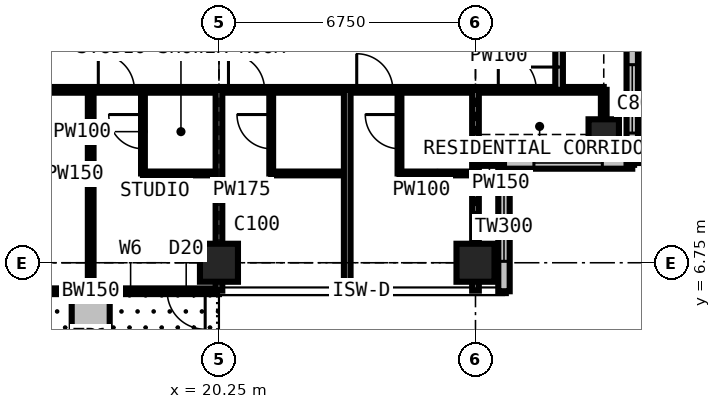
"""IFC4 building model, lengths in metres.
Left out: names, types, materials, properties, quantities, classifications, styles, units other than length and angle.
Written with IfcOpenShell. Run it as: python <this file> out.ifc"""

import sys

from ifc_helpers import new_model, si_unit, direction, frame, frame_2d, origin, origin_2d, place, context, subcontext, project, spatial, rectangle, extrude, element, fill, save


model = new_model("IFC4")
c1 = context("Model", 3, precision=1e-05, world=origin(), true_north=direction((0.0, 1.0)))
c2 = subcontext(c1, "Body", "Model", "MODEL_VIEW")
j1 = project(units=[si_unit("LENGTHUNIT", "METRE"), si_unit("PLANEANGLEUNIT", "RADIAN")], contexts=[c1])
p1 = place(None, origin())
s1 = spatial("IfcSite", under=j1, at=p1, CompositionType="ELEMENT")
p2 = place(p1, origin())
s2 = spatial("IfcBuilding", under=s1, at=p2, CompositionType="ELEMENT")
p3 = place(p2, frame((0.0, 0.0, 240.3)))
s3 = spatial("IfcBuildingStorey", under=s2, at=p3, CompositionType="ELEMENT", Elevation=240.3)
for number, where, z_axis, x_axis in (
    (1, (20.25, 6.75, 0.0), (0.0, 0.0, 1.0), (1.0, 0.0, 0.0)),
    (2, (27.0, 6.75, 0.0), (0.0, 0.0, 1.0), (1.0, 0.0, 0.0)),
):
    element("IfcColumn", number, at=place(p3, frame(where, z_axis=z_axis, x_axis=x_axis)), inside=s3, PredefinedType="COLUMN", context=c2, shape_type="SweptSolid", body=[
        extrude(rectangle(XDim=1.0, YDim=1.0, at=origin_2d()), origin(), (0.0, 0.0, 1.0), 3.6),
    ])
p4 = place(p3, frame((30.375, 10.125, 0.0), z_axis=(0.0, 0.0, 1.0), x_axis=(1.0, 0.0, 0.0)))
e3 = element("IfcColumn", 3, at=p4, inside=s3, PredefinedType="COLUMN", context=c2, shape_type="SweptSolid", body=[
    extrude(rectangle(XDim=0.8, YDim=0.8, at=origin_2d()), origin(), (0.0, 0.0, 1.0), 3.6),
])
p5 = place(p3, frame((20.25, 6.0, 0.0), z_axis=(0.0, 0.0, 1.0), x_axis=(-1.0, 0.0, 0.0)))
e4 = element("IfcWall", 4, at=p5, inside=s3, PredefinedType="SOLIDWALL", context=c2, shape_type="SweptSolid", body=[
    extrude(rectangle(XDim=6.75, YDim=0.15, at=frame_2d((3.375, 0.0))), origin(), (0.0, 0.0, 1.0), 3.375),
])
p6 = place(p5, frame((0.363, 0.0, 0.0)))
e5 = element("IfcOpeningElement", 5, at=p6, cuts=e4, PredefinedType="OPENING", context=c2, shape_type="SweptSolid", body=[
    extrude(rectangle(XDim=1.0, YDim=2.2, at=frame_2d((0.5, 1.1))), frame((0.0, 0.085, 0.0), z_axis=(0.0, -1.0, 0.0), x_axis=(1.0, 0.0, 0.0)), (0.0, 0.0, 1.0), 0.17),
])
p7 = place(p5, frame((1.725, 0.0, 0.9)))
e6 = element("IfcOpeningElement", 6, at=p7, cuts=e4, PredefinedType="OPENING", context=c2, shape_type="SweptSolid", body=[
    extrude(rectangle(XDim=1.2, YDim=1.8, at=frame_2d((0.6, 0.9))), frame((0.0, 0.085, 0.0), z_axis=(0.0, -1.0, 0.0), x_axis=(1.0, 0.0, 0.0)), (0.0, 0.0, 1.0), 0.17),
])
p8 = place(p5, frame((5.387, 0.0, 0.0)))
e7 = element("IfcOpeningElement", 7, at=p8, cuts=e4, PredefinedType="OPENING", context=c2, shape_type="SweptSolid", body=[
    extrude(rectangle(XDim=1.0, YDim=2.2, at=frame_2d((0.5, 1.1))), frame((0.0, 0.085, 0.0), z_axis=(0.0, -1.0, 0.0), x_axis=(1.0, 0.0, 0.0)), (0.0, 0.0, 1.0), 0.17),
])
p9 = place(p5, frame((3.825, 0.0, 0.9)))
e8 = element("IfcOpeningElement", 8, at=p9, cuts=e4, PredefinedType="OPENING", context=c2, shape_type="SweptSolid", body=[
    extrude(rectangle(XDim=1.2, YDim=1.8, at=frame_2d((0.6, 0.9))), frame((0.0, 0.085, 0.0), z_axis=(0.0, -1.0, 0.0), x_axis=(1.0, 0.0, 0.0)), (0.0, 0.0, 1.0), 0.17),
])
p10 = place(p3, frame((27.75, 6.0, 0.0), z_axis=(0.0, 0.0, 1.0), x_axis=(0.0, 1.0, 0.0)))
e9 = element("IfcWall", 9, at=p10, inside=s3, PredefinedType="SOLIDWALL", context=c2, shape_type="SweptSolid", body=[
    extrude(rectangle(XDim=3.375, YDim=0.3, at=frame_2d((1.688, 0.0))), origin(), (0.0, 0.0, 1.0), 3.375),
])
p11 = place(p10, frame((0.788, 0.0, 0.6)))
e10 = element("IfcOpeningElement", 10, at=p11, cuts=e9, PredefinedType="OPENING", context=c2, shape_type="SweptSolid", body=[
    extrude(rectangle(XDim=1.8, YDim=2.1, at=frame_2d((0.9, 1.05))), frame((0.0, 0.16, 0.0), z_axis=(0.0, -1.0, 0.0), x_axis=(1.0, 0.0, 0.0)), (0.0, 0.0, 1.0), 0.32),
])
p12 = place(p3, frame((27.75, 9.375, 0.0), z_axis=(0.0, 0.0, 1.0), x_axis=(1.0, 0.0, 0.0)))
e11 = element("IfcWall", 11, at=p12, inside=s3, PredefinedType="SOLIDWALL", context=c2, shape_type="SweptSolid", body=[
    extrude(rectangle(XDim=3.375, YDim=0.3, at=frame_2d((1.688, 0.0))), origin(), (0.0, 0.0, 1.0), 3.375),
])
p13 = place(p12, frame((0.788, 0.0, 0.6)))
e12 = element("IfcOpeningElement", 12, at=p13, cuts=e11, PredefinedType="OPENING", context=c2, shape_type="SweptSolid", body=[
    extrude(rectangle(XDim=1.8, YDim=2.1, at=frame_2d((0.9, 1.05))), frame((0.0, 0.16, 0.0), z_axis=(0.0, -1.0, 0.0), x_axis=(1.0, 0.0, 0.0)), (0.0, 0.0, 1.0), 0.32),
])
p14 = place(p3, frame((31.125, 9.375, 0.0), z_axis=(0.0, 0.0, 1.0), x_axis=(0.0, 1.0, 0.0)))
e13 = element("IfcWall", 13, at=p14, inside=s3, PredefinedType="SOLIDWALL", context=c2, shape_type="SweptSolid", body=[
    extrude(rectangle(XDim=3.375, YDim=0.3, at=frame_2d((1.688, 0.0))), origin(), (0.0, 0.0, 1.0), 3.375),
])
p15 = place(p14, frame((0.788, 0.0, 0.6)))
e14 = element("IfcOpeningElement", 14, at=p15, cuts=e13, PredefinedType="OPENING", context=c2, shape_type="SweptSolid", body=[
    extrude(rectangle(XDim=1.8, YDim=2.1, at=frame_2d((0.9, 1.05))), frame((0.0, 0.16, 0.0), z_axis=(0.0, -1.0, 0.0), x_axis=(1.0, 0.0, 0.0)), (0.0, 0.0, 1.0), 0.32),
])
p16 = place(p3, frame((16.875, 5.9, 0.0), z_axis=(0.0, 0.0, 1.0), x_axis=(0.0, -1.0, 0.0)))
e15 = element("IfcWall", 15, at=p16, inside=s3, PredefinedType="USERDEFINED", context=c2, shape_type="SweptSolid", body=[
    extrude(rectangle(XDim=2.2, YDim=1.0, at=frame_2d((1.1, 0.0))), origin(), (0.0, 0.0, 1.0), 0.9),
])
p17 = place(p3, frame((10.125, 11.3, 0.0), z_axis=(0.0, 0.0, 1.0), x_axis=(1.0, 0.0, 0.0)))
e16 = element("IfcWall", 16, at=p17, inside=s3, PredefinedType="PARTITIONING", context=c2, shape_type="SweptSolid", body=[
    extrude(rectangle(XDim=20.25, YDim=0.15, at=frame_2d((10.125, 0.0))), origin(), (0.0, 0.0, 1.0), 3.375),
])
p18 = place(p17, frame((6.95, 0.0, 0.0)))
e17 = element("IfcOpeningElement", 17, at=p18, cuts=e16, PredefinedType="OPENING", context=c2, shape_type="SweptSolid", body=[
    extrude(rectangle(XDim=0.95, YDim=2.2, at=frame_2d((0.475, 1.1))), frame((0.0, 0.085, 0.0), z_axis=(0.0, -1.0, 0.0), x_axis=(1.0, 0.0, 0.0)), (0.0, 0.0, 1.0), 0.17),
])
p19 = place(p17, frame((10.375, 0.0, 0.0)))
e18 = element("IfcOpeningElement", 18, at=p19, cuts=e16, PredefinedType="OPENING", context=c2, shape_type="SweptSolid", body=[
    extrude(rectangle(XDim=0.95, YDim=2.2, at=frame_2d((0.475, 1.1))), frame((0.0, 0.085, 0.0), z_axis=(0.0, -1.0, 0.0), x_axis=(1.0, 0.0, 0.0)), (0.0, 0.0, 1.0), 0.17),
])
p20 = place(p17, frame((13.75, 0.0, 0.0)))
e19 = element("IfcOpeningElement", 19, at=p20, cuts=e16, PredefinedType="OPENING", context=c2, shape_type="SweptSolid", body=[
    extrude(rectangle(XDim=0.95, YDim=2.2, at=frame_2d((0.475, 1.1))), frame((0.0, 0.085, 0.0), z_axis=(0.0, -1.0, 0.0), x_axis=(1.0, 0.0, 0.0)), (0.0, 0.0, 1.0), 0.17),
])
p21 = place(p17, frame((17.475, 0.0, 0.0)))
e20 = element("IfcOpeningElement", 20, at=p21, cuts=e16, PredefinedType="OPENING", context=c2, shape_type="SweptSolid", body=[
    extrude(rectangle(XDim=1.0, YDim=2.2, at=frame_2d((0.5, 1.1))), frame((0.0, 0.085, 0.0), z_axis=(0.0, -1.0, 0.0), x_axis=(1.0, 0.0, 0.0)), (0.0, 0.0, 1.0), 0.17),
])
p22 = place(p3, frame((16.875, 6.016, 0.0), z_axis=(0.0, 0.0, 1.0), x_axis=(0.0, 1.0, 0.0)))
e21 = element("IfcWall", 21, at=p22, inside=s3, PredefinedType="PARTITIONING", context=c2, shape_type="SweptSolid", body=[
    extrude(rectangle(XDim=5.284, YDim=0.15, at=frame_2d((2.642, 0.0))), origin(), (0.0, 0.0, 1.0), 3.375),
])
p23 = place(p3, frame((18.25, 9.1, 0.0), z_axis=(0.0, 0.0, 1.0), x_axis=(0.0, 1.0, 0.0)))
e22 = element("IfcWall", 22, at=p23, inside=s3, PredefinedType="PARTITIONING", context=c2, shape_type="SweptSolid", body=[
    extrude(rectangle(XDim=2.2, YDim=0.1, at=frame_2d((1.1, 0.0))), origin(), (0.0, 0.0, 1.0), 3.375),
])
p24 = place(p23, frame((0.65, 0.0, 0.0)))
e23 = element("IfcOpeningElement", 23, at=p24, cuts=e22, PredefinedType="OPENING", context=c2, shape_type="SweptSolid", body=[
    extrude(rectangle(XDim=0.9, YDim=2.2, at=frame_2d((0.45, 1.1))), frame((0.0, 0.06, 0.0), z_axis=(0.0, -1.0, 0.0), x_axis=(1.0, 0.0, 0.0)), (0.0, 0.0, 1.0), 0.12),
])
p25 = place(p3, frame((18.25, 9.1, 0.0), z_axis=(0.0, 0.0, 1.0), x_axis=(1.0, 0.0, 0.0)))
e24 = element("IfcWall", 24, at=p25, inside=s3, PredefinedType="PARTITIONING", context=c2, shape_type="SweptSolid", body=[
    extrude(rectangle(XDim=2.0, YDim=0.1, at=frame_2d((1.0, 0.0))), origin(), (0.0, 0.0, 1.0), 3.375),
])
p26 = place(p3, frame((20.25, 6.016, 0.0), z_axis=(0.0, 0.0, 1.0), x_axis=(0.0, 1.0, 0.0)))
e25 = element("IfcWall", 25, at=p26, inside=s3, PredefinedType="PARTITIONING", context=c2, shape_type="SweptSolid", body=[
    extrude(rectangle(XDim=5.284, YDim=0.175, at=frame_2d((2.642, 0.0))), origin(), (0.0, 0.0, 1.0), 2.877),
])
p27 = place(p3, frame((21.625, 9.1, 0.0), z_axis=(0.0, 0.0, 1.0), x_axis=(0.0, 1.0, 0.0)))
e26 = element("IfcWall", 26, at=p27, inside=s3, PredefinedType="PARTITIONING", context=c2, shape_type="SweptSolid", body=[
    extrude(rectangle(XDim=2.2, YDim=0.1, at=frame_2d((1.1, 0.0))), origin(), (0.0, 0.0, 1.0), 3.375),
])
p28 = place(p27, frame((0.65, 0.0, 0.0)))
e27 = element("IfcOpeningElement", 27, at=p28, cuts=e26, PredefinedType="OPENING", context=c2, shape_type="SweptSolid", body=[
    extrude(rectangle(XDim=0.9, YDim=2.2, at=frame_2d((0.45, 1.1))), frame((0.0, 0.06, 0.0), z_axis=(0.0, -1.0, 0.0), x_axis=(1.0, 0.0, 0.0)), (0.0, 0.0, 1.0), 0.12),
])
p29 = place(p3, frame((21.625, 9.1, 0.0), z_axis=(0.0, 0.0, 1.0), x_axis=(1.0, 0.0, 0.0)))
e28 = element("IfcWall", 28, at=p29, inside=s3, PredefinedType="PARTITIONING", context=c2, shape_type="SweptSolid", body=[
    extrude(rectangle(XDim=2.0, YDim=0.1, at=frame_2d((1.0, 0.0))), origin(), (0.0, 0.0, 1.0), 3.375),
])
p30 = place(p3, frame((23.625, 6.016, 0.0), z_axis=(0.0, 0.0, 1.0), x_axis=(0.0, 1.0, 0.0)))
e29 = element("IfcWall", 29, at=p30, inside=s3, PredefinedType="PARTITIONING", context=c2, shape_type="SweptSolid", body=[
    extrude(rectangle(XDim=5.284, YDim=0.175, at=frame_2d((2.642, 0.0))), origin(), (0.0, 0.0, 1.0), 3.375),
])
p31 = place(p3, frame((25.0, 9.1, 0.0), z_axis=(0.0, 0.0, 1.0), x_axis=(0.0, 1.0, 0.0)))
e30 = element("IfcWall", 30, at=p31, inside=s3, PredefinedType="PARTITIONING", context=c2, shape_type="SweptSolid", body=[
    extrude(rectangle(XDim=2.2, YDim=0.1, at=frame_2d((1.1, 0.0))), origin(), (0.0, 0.0, 1.0), 3.375),
])
p32 = place(p31, frame((0.65, 0.0, 0.0)))
e31 = element("IfcOpeningElement", 31, at=p32, cuts=e30, PredefinedType="OPENING", context=c2, shape_type="SweptSolid", body=[
    extrude(rectangle(XDim=0.9, YDim=2.2, at=frame_2d((0.45, 1.1))), frame((0.0, 0.06, 0.0), z_axis=(0.0, -1.0, 0.0), x_axis=(1.0, 0.0, 0.0)), (0.0, 0.0, 1.0), 0.12),
])
p33 = place(p3, frame((25.0, 9.1, 0.0), z_axis=(0.0, 0.0, 1.0), x_axis=(1.0, 0.0, 0.0)))
e32 = element("IfcWall", 32, at=p33, inside=s3, PredefinedType="PARTITIONING", context=c2, shape_type="SweptSolid", body=[
    extrude(rectangle(XDim=2.0, YDim=0.1, at=frame_2d((1.0, 0.0))), origin(), (0.0, 0.0, 1.0), 3.375),
])
p34 = place(p3, frame((27.0, 6.016, 0.0), z_axis=(0.0, 0.0, 1.0), x_axis=(0.0, 1.0, 0.0)))
e33 = element("IfcWall", 33, at=p34, inside=s3, PredefinedType="PARTITIONING", context=c2, shape_type="SweptSolid", body=[
    extrude(rectangle(XDim=5.284, YDim=0.175, at=frame_2d((2.642, 0.0))), origin(), (0.0, 0.0, 1.0), 2.877),
])
p35 = place(p3, frame((27.0, 9.375, 0.0), z_axis=(0.0, 0.0, 1.0), x_axis=(1.0, 0.0, 0.0)))
e34 = element("IfcWall", 34, at=p35, inside=s3, PredefinedType="PARTITIONING", context=c2, shape_type="SweptSolid", body=[
    extrude(rectangle(XDim=0.734, YDim=0.15, at=frame_2d((0.367, 0.0))), origin(), (0.0, 0.0, 1.0), 3.375),
])
p36 = place(p3, frame((29.2, 11.3, 0.0), z_axis=(0.0, 0.0, 1.0), x_axis=(0.0, 1.0, 0.0)))
e35 = element("IfcWall", 35, at=p36, inside=s3, PredefinedType="PARTITIONING", context=c2, shape_type="SweptSolid", body=[
    extrude(rectangle(XDim=17.9, YDim=0.2, at=frame_2d((8.95, 0.0))), origin(), (0.0, 0.0, 1.0), 3.375),
])
p37 = place(p36, frame((0.6, 0.0, 0.0)))
e36 = element("IfcOpeningElement", 36, at=p37, cuts=e35, PredefinedType="OPENING", context=c2, shape_type="SweptSolid", body=[
    extrude(rectangle(XDim=1.0, YDim=2.2, at=frame_2d((0.5, 1.1))), frame((0.0, 0.11, 0.0), z_axis=(0.0, -1.0, 0.0), x_axis=(1.0, 0.0, 0.0)), (0.0, 0.0, 1.0), 0.22),
])
p38 = place(p36, frame((2.4, 0.0, 0.0)))
e37 = element("IfcOpeningElement", 37, at=p38, cuts=e35, PredefinedType="OPENING", context=c2, shape_type="SweptSolid", body=[
    extrude(rectangle(XDim=0.95, YDim=2.2, at=frame_2d((0.475, 1.1))), frame((0.0, 0.11, 0.0), z_axis=(0.0, -1.0, 0.0), x_axis=(1.0, 0.0, 0.0)), (0.0, 0.0, 1.0), 0.22),
])
p39 = place(p36, frame((5.825, 0.0, 0.0)))
e38 = element("IfcOpeningElement", 38, at=p39, cuts=e35, PredefinedType="OPENING", context=c2, shape_type="SweptSolid", body=[
    extrude(rectangle(XDim=0.95, YDim=2.2, at=frame_2d((0.475, 1.1))), frame((0.0, 0.11, 0.0), z_axis=(0.0, -1.0, 0.0), x_axis=(1.0, 0.0, 0.0)), (0.0, 0.0, 1.0), 0.22),
])
p40 = place(p36, frame((9.2, 0.0, 0.0)))
e39 = element("IfcOpeningElement", 39, at=p40, cuts=e35, PredefinedType="OPENING", context=c2, shape_type="SweptSolid", body=[
    extrude(rectangle(XDim=0.95, YDim=2.2, at=frame_2d((0.475, 1.1))), frame((0.0, 0.11, 0.0), z_axis=(0.0, -1.0, 0.0), x_axis=(1.0, 0.0, 0.0)), (0.0, 0.0, 1.0), 0.22),
])
p41 = place(p36, frame((12.575, 0.0, 0.0)))
e40 = element("IfcOpeningElement", 40, at=p41, cuts=e35, PredefinedType="OPENING", context=c2, shape_type="SweptSolid", body=[
    extrude(rectangle(XDim=0.95, YDim=2.2, at=frame_2d((0.475, 1.1))), frame((0.0, 0.11, 0.0), z_axis=(0.0, -1.0, 0.0), x_axis=(1.0, 0.0, 0.0)), (0.0, 0.0, 1.0), 0.22),
])
p42 = place(p36, frame((16.3, 0.0, 0.0)))
e41 = element("IfcOpeningElement", 41, at=p42, cuts=e35, PredefinedType="OPENING", context=c2, shape_type="SweptSolid", body=[
    extrude(rectangle(XDim=1.0, YDim=2.2, at=frame_2d((0.5, 1.1))), frame((0.0, 0.11, 0.0), z_axis=(0.0, -1.0, 0.0), x_axis=(1.0, 0.0, 0.0)), (0.0, 0.0, 1.0), 0.22),
])
p43 = place(p3, frame((30.375, 9.525, 0.0), z_axis=(0.0, 0.0, 1.0), x_axis=(0.0, 1.0, 0.0)))
e42 = element("IfcWall", 42, at=p43, inside=s3, PredefinedType="PARTITIONING", context=c2, shape_type="SweptSolid", body=[
    extrude(rectangle(XDim=1.775, YDim=0.15, at=frame_2d((0.888, 0.0))), origin(), (0.0, 0.0, 1.0), 2.877),
])
p44 = place(p6, origin())
e43 = element("IfcDoor", 43, at=p44, inside=s3, OperationType="SINGLE_SWING_LEFT", PredefinedType="DOOR", context=c2, shape_type="SweptSolid", body=[
    extrude(rectangle(XDim=1.0, YDim=2.2, at=frame_2d((0.5, 1.1))), frame((0.0, 0.025, 0.0), z_axis=(0.0, -1.0, 0.0), x_axis=(1.0, 0.0, 0.0)), (0.0, 0.0, 1.0), 0.05),
])
fill(e5, e43)
p45 = place(p7, origin())
e44 = element("IfcWindow", 44, at=p45, inside=s3, PartitioningType="SINGLE_PANEL", PredefinedType="WINDOW", context=c2, shape_type="SweptSolid", body=[
    extrude(rectangle(XDim=1.2, YDim=1.8, at=frame_2d((0.6, 0.9))), frame((0.0, 0.03, 0.0), z_axis=(0.0, -1.0, 0.0), x_axis=(1.0, 0.0, 0.0)), (0.0, 0.0, 1.0), 0.06),
])
fill(e6, e44)
p46 = place(p9, origin())
e45 = element("IfcWindow", 45, at=p46, inside=s3, PartitioningType="SINGLE_PANEL", PredefinedType="WINDOW", context=c2, shape_type="SweptSolid", body=[
    extrude(rectangle(XDim=1.2, YDim=1.8, at=frame_2d((0.6, 0.9))), frame((0.0, 0.03, 0.0), z_axis=(0.0, -1.0, 0.0), x_axis=(1.0, 0.0, 0.0)), (0.0, 0.0, 1.0), 0.06),
])
fill(e8, e45)
p47 = place(p11, origin())
e46 = element("IfcWindow", 46, at=p47, inside=s3, PartitioningType="SINGLE_PANEL", PredefinedType="WINDOW", context=c2, shape_type="SweptSolid", body=[
    extrude(rectangle(XDim=1.8, YDim=2.1, at=frame_2d((0.9, 1.05))), frame((0.0, 0.03, 0.0), z_axis=(0.0, -1.0, 0.0), x_axis=(1.0, 0.0, 0.0)), (0.0, 0.0, 1.0), 0.06),
])
fill(e10, e46)
p48 = place(p13, origin())
e47 = element("IfcWindow", 47, at=p48, inside=s3, PartitioningType="SINGLE_PANEL", PredefinedType="WINDOW", context=c2, shape_type="SweptSolid", body=[
    extrude(rectangle(XDim=1.8, YDim=2.1, at=frame_2d((0.9, 1.05))), frame((0.0, 0.03, 0.0), z_axis=(0.0, -1.0, 0.0), x_axis=(1.0, 0.0, 0.0)), (0.0, 0.0, 1.0), 0.06),
])
fill(e12, e47)
p49 = place(p15, origin())
e48 = element("IfcWindow", 48, at=p49, inside=s3, PartitioningType="SINGLE_PANEL", PredefinedType="WINDOW", context=c2, shape_type="SweptSolid", body=[
    extrude(rectangle(XDim=1.8, YDim=2.1, at=frame_2d((0.9, 1.05))), frame((0.0, 0.03, 0.0), z_axis=(0.0, -1.0, 0.0), x_axis=(1.0, 0.0, 0.0)), (0.0, 0.0, 1.0), 0.06),
])
fill(e14, e48)
p50 = place(p18, origin())
e49 = element("IfcDoor", 49, at=p50, inside=s3, OperationType="SINGLE_SWING_LEFT", PredefinedType="DOOR", context=c2, shape_type="SweptSolid", body=[
    extrude(rectangle(XDim=0.95, YDim=2.2, at=frame_2d((0.475, 1.1))), frame((0.0, 0.025, 0.0), z_axis=(0.0, -1.0, 0.0), x_axis=(1.0, 0.0, 0.0)), (0.0, 0.0, 1.0), 0.05),
])
fill(e17, e49)
p51 = place(p24, origin())
e50 = element("IfcDoor", 50, at=p51, inside=s3, OperationType="SINGLE_SWING_RIGHT", PredefinedType="DOOR", context=c2, shape_type="SweptSolid", body=[
    extrude(rectangle(XDim=0.9, YDim=2.2, at=frame_2d((0.45, 1.1))), frame((0.0, 0.025, 0.0), z_axis=(0.0, -1.0, 0.0), x_axis=(1.0, 0.0, 0.0)), (0.0, 0.0, 1.0), 0.05),
])
fill(e23, e50)
p52 = place(p19, origin())
e51 = element("IfcDoor", 51, at=p52, inside=s3, OperationType="SINGLE_SWING_LEFT", PredefinedType="DOOR", context=c2, shape_type="SweptSolid", body=[
    extrude(rectangle(XDim=0.95, YDim=2.2, at=frame_2d((0.475, 1.1))), frame((0.0, 0.025, 0.0), z_axis=(0.0, -1.0, 0.0), x_axis=(1.0, 0.0, 0.0)), (0.0, 0.0, 1.0), 0.05),
])
fill(e18, e51)
p53 = place(p28, origin())
e52 = element("IfcDoor", 52, at=p53, inside=s3, OperationType="SINGLE_SWING_RIGHT", PredefinedType="DOOR", context=c2, shape_type="SweptSolid", body=[
    extrude(rectangle(XDim=0.9, YDim=2.2, at=frame_2d((0.45, 1.1))), frame((0.0, 0.025, 0.0), z_axis=(0.0, -1.0, 0.0), x_axis=(1.0, 0.0, 0.0)), (0.0, 0.0, 1.0), 0.05),
])
fill(e27, e52)
p54 = place(p20, origin())
e53 = element("IfcDoor", 53, at=p54, inside=s3, OperationType="SINGLE_SWING_LEFT", PredefinedType="DOOR", context=c2, shape_type="SweptSolid", body=[
    extrude(rectangle(XDim=0.95, YDim=2.2, at=frame_2d((0.475, 1.1))), frame((0.0, 0.025, 0.0), z_axis=(0.0, -1.0, 0.0), x_axis=(1.0, 0.0, 0.0)), (0.0, 0.0, 1.0), 0.05),
])
fill(e19, e53)
p55 = place(p32, origin())
e54 = element("IfcDoor", 54, at=p55, inside=s3, OperationType="SINGLE_SWING_RIGHT", PredefinedType="DOOR", context=c2, shape_type="SweptSolid", body=[
    extrude(rectangle(XDim=0.9, YDim=2.2, at=frame_2d((0.45, 1.1))), frame((0.0, 0.025, 0.0), z_axis=(0.0, -1.0, 0.0), x_axis=(1.0, 0.0, 0.0)), (0.0, 0.0, 1.0), 0.05),
])
fill(e31, e54)
p56 = place(p21, origin())
e55 = element("IfcDoor", 55, at=p56, inside=s3, OperationType="SINGLE_SWING_LEFT", PredefinedType="DOOR", context=c2, shape_type="SweptSolid", body=[
    extrude(rectangle(XDim=1.0, YDim=2.2, at=frame_2d((0.5, 1.1))), frame((0.0, 0.025, 0.0), z_axis=(0.0, -1.0, 0.0), x_axis=(1.0, 0.0, 0.0)), (0.0, 0.0, 1.0), 0.05),
])
fill(e20, e55)
p57 = place(p37, origin())
e56 = element("IfcDoor", 56, at=p57, inside=s3, OperationType="SINGLE_SWING_LEFT", PredefinedType="DOOR", context=c2, shape_type="SweptSolid", body=[
    extrude(rectangle(XDim=1.0, YDim=2.2, at=frame_2d((0.5, 1.1))), frame((0.0, 0.025, 0.0), z_axis=(0.0, -1.0, 0.0), x_axis=(1.0, 0.0, 0.0)), (0.0, 0.0, 1.0), 0.05),
])
fill(e36, e56)
save(model, sys.argv[1])
